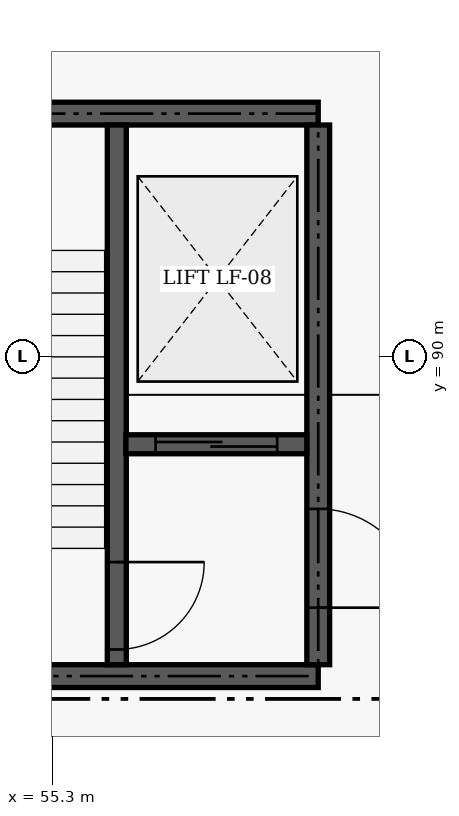
"""IFC4 building model, lengths in metres.
Left out: names, types, materials, properties, quantities, classifications, styles, units other than length and angle.
Written with IfcOpenShell. Run it as: python <this file> out.ifc"""

import sys

from ifc_helpers import new_model, si_unit, direction, frame, frame_2d, origin, place, context, subcontext, project, spatial, rectangle, extrude, element, fill, save


model = new_model("IFC4")
c1 = context("Model", 3, precision=1e-05, world=origin(), true_north=direction((0.0, 1.0)))
c2 = subcontext(c1, "Body", "Model", "MODEL_VIEW")
j1 = project(units=[si_unit("LENGTHUNIT", "METRE"), si_unit("PLANEANGLEUNIT", "RADIAN")], contexts=[c1])
p1 = place(None, origin())
s1 = spatial("IfcSite", under=j1, at=p1, CompositionType="ELEMENT")
p2 = place(p1, origin())
s2 = spatial("IfcBuilding", under=s1, at=p2, CompositionType="ELEMENT")
p3 = place(p2, origin())
s3 = spatial("IfcBuildingStorey", under=s2, at=p3, CompositionType="ELEMENT", Elevation=0.0)
p4 = place(p3, frame((52.2, 85.8, 0.0), z_axis=(0.0, 0.0, 1.0), x_axis=(1.0, 0.0, 0.0)))
e1 = element("IfcWall", 1, at=p4, inside=s3, PredefinedType="SHEAR", context=c2, shape_type="SweptSolid", body=[
    extrude(rectangle(XDim=6.6, YDim=0.3, at=frame_2d((3.3, 0.0))), origin(), (0.0, 0.0, 1.0), 5.4),
])
p5 = place(p4, frame((1.0, 0.0, 0.0)))
e2 = element("IfcOpeningElement", 2, at=p5, cuts=e1, PredefinedType="OPENING", context=c2, shape_type="SweptSolid", body=[
    extrude(rectangle(XDim=1.8, YDim=2.15, at=frame_2d((0.9, 1.075))), frame((0.0, 0.16, 0.0), z_axis=(0.0, -1.0, 0.0), x_axis=(1.0, 0.0, 0.0)), (0.0, 0.0, 1.0), 0.32),
])
p6 = place(p3, frame((52.2, 93.2, 0.0), z_axis=(0.0, 0.0, 1.0), x_axis=(1.0, 0.0, 0.0)))
e3 = element("IfcWall", 3, at=p6, inside=s3, PredefinedType="SHEAR", context=c2, shape_type="SweptSolid", body=[
    extrude(rectangle(XDim=6.6, YDim=0.3, at=frame_2d((3.3, 0.0))), origin(), (0.0, 0.0, 1.0), 5.4),
])
p7 = place(p3, frame((58.8, 85.95, 0.0), z_axis=(0.0, 0.0, 1.0), x_axis=(0.0, 1.0, 0.0)))
e4 = element("IfcWall", 4, at=p7, inside=s3, PredefinedType="SHEAR", context=c2, shape_type="SweptSolid", body=[
    extrude(rectangle(XDim=7.1, YDim=0.3, at=frame_2d((3.55, 0.0))), origin(), (0.0, 0.0, 1.0), 5.4),
])
p8 = place(p7, frame((0.75, 0.0, 0.0)))
e5 = element("IfcOpeningElement", 5, at=p8, cuts=e4, PredefinedType="OPENING", context=c2, shape_type="SweptSolid", body=[
    extrude(rectangle(XDim=1.3, YDim=2.15, at=frame_2d((0.65, 1.075))), frame((0.0, 0.16, 0.0), z_axis=(0.0, -1.0, 0.0), x_axis=(1.0, 0.0, 0.0)), (0.0, 0.0, 1.0), 0.32),
])
p9 = place(p3, frame((56.15, 85.95, 0.0), z_axis=(0.0, 0.0, 1.0), x_axis=(0.0, 1.0, 0.0)))
e6 = element("IfcWall", 6, at=p9, inside=s3, PredefinedType="SHEAR", context=c2, shape_type="SweptSolid", body=[
    extrude(rectangle(XDim=7.1, YDim=0.25, at=frame_2d((3.55, 0.0))), origin(), (0.0, 0.0, 1.0), 5.4),
])
p10 = place(p9, frame((0.2, 0.0, 0.0)))
e7 = element("IfcOpeningElement", 7, at=p10, cuts=e6, PredefinedType="OPENING", context=c2, shape_type="SweptSolid", body=[
    extrude(rectangle(XDim=1.15, YDim=2.15, at=frame_2d((0.575, 1.075))), frame((0.0, 0.135, 0.0), z_axis=(0.0, -1.0, 0.0), x_axis=(1.0, 0.0, 0.0)), (0.0, 0.0, 1.0), 0.27),
])
p11 = place(p3, frame((56.27, 88.85, 0.0), z_axis=(0.0, 0.0, 1.0), x_axis=(1.0, 0.0, 0.0)))
e8 = element("IfcWall", 8, at=p11, inside=s3, PredefinedType="SHEAR", context=c2, shape_type="SweptSolid", body=[
    extrude(rectangle(XDim=2.38, YDim=0.25, at=frame_2d((1.19, 0.0))), origin(), (0.0, 0.0, 1.0), 5.4),
])
p12 = place(p11, frame((0.39, 0.0, 0.0)))
e9 = element("IfcOpeningElement", 9, at=p12, cuts=e8, PredefinedType="OPENING", context=c2, shape_type="SweptSolid", body=[
    extrude(rectangle(XDim=1.6, YDim=2.3, at=frame_2d((0.8, 1.15))), frame((0.0, 0.135, 0.0), z_axis=(0.0, -1.0, 0.0), x_axis=(1.0, 0.0, 0.0)), (0.0, 0.0, 1.0), 0.27),
])
p13 = place(p8, frame((1.3, 0.0, 0.0), z_axis=(0.0, 0.0, 1.0), x_axis=(-1.0, 0.0, 0.0)))
e10 = element("IfcDoor", 10, at=p13, inside=s3, OperationType="DOUBLE_DOOR_SINGLE_SWING", PredefinedType="DOOR", context=c2, shape_type="SweptSolid", body=[
    extrude(rectangle(XDim=1.3, YDim=2.15, at=frame_2d((0.65, 1.075))), frame((0.0, 0.025, 0.0), z_axis=(0.0, -1.0, 0.0), x_axis=(1.0, 0.0, 0.0)), (0.0, 0.0, 1.0), 0.05),
])
fill(e5, e10)
p14 = place(p10, origin())
e11 = element("IfcDoor", 11, at=p14, inside=s3, OperationType="SINGLE_SWING_RIGHT", PredefinedType="DOOR", context=c2, shape_type="SweptSolid", body=[
    extrude(rectangle(XDim=1.15, YDim=2.15, at=frame_2d((0.575, 1.075))), frame((0.0, 0.025, 0.0), z_axis=(0.0, -1.0, 0.0), x_axis=(1.0, 0.0, 0.0)), (0.0, 0.0, 1.0), 0.05),
])
fill(e7, e11)
p15 = place(p12, origin())
e12 = element("IfcDoor", 12, at=p15, inside=s3, OperationType="SLIDING_TO_LEFT", PredefinedType="DOOR", context=c2, shape_type="SweptSolid", body=[
    extrude(rectangle(XDim=1.6, YDim=2.3, at=frame_2d((0.8, 1.15))), frame((0.0, 0.025, 0.0), z_axis=(0.0, -1.0, 0.0), x_axis=(1.0, 0.0, 0.0)), (0.0, 0.0, 1.0), 0.05),
])
fill(e9, e12)
save(model, sys.argv[1])
